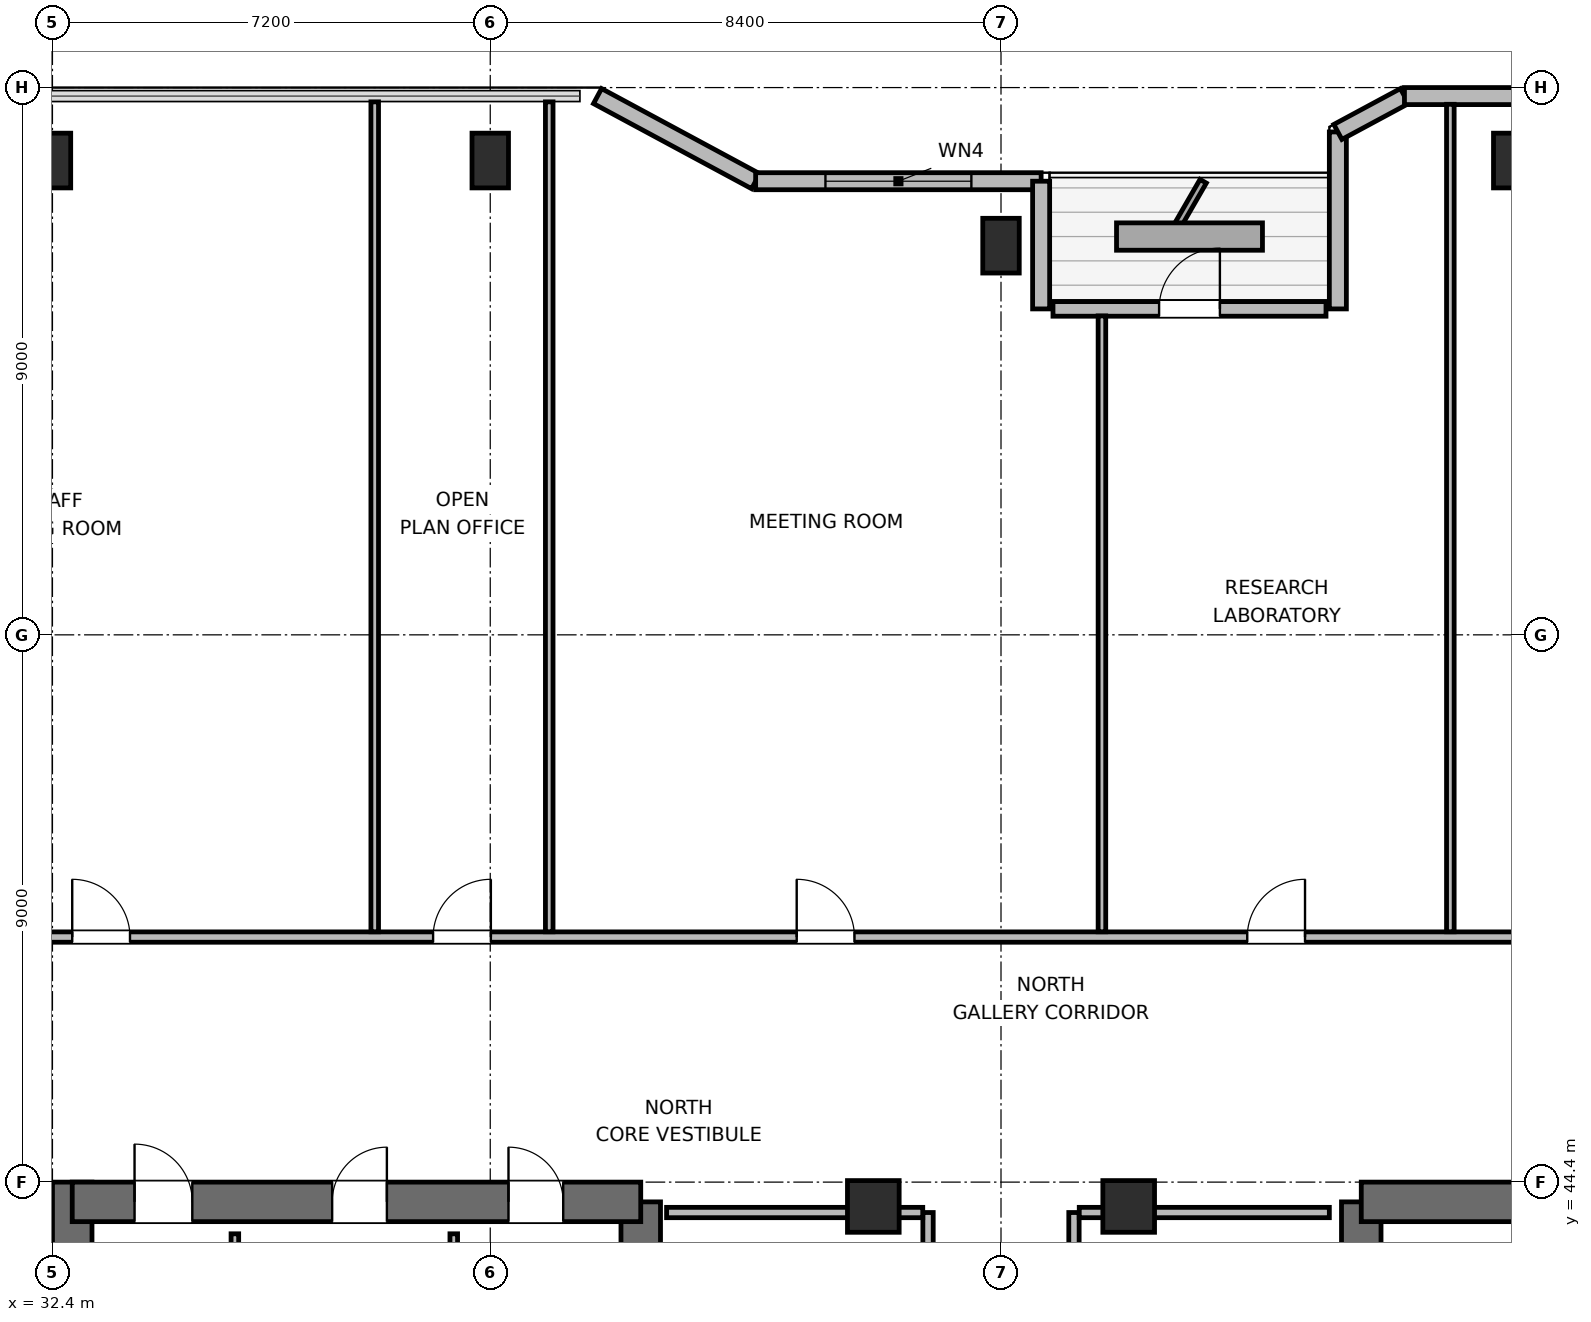
"""IFC4 building model, lengths in metres.
Left out: names, types, materials, properties, quantities, classifications, styles, units other than length and angle.
Written with IfcOpenShell. Run it as: python <this file> out.ifc"""

import sys

from ifc_helpers import new_model, si_unit, direction, frame, frame_2d, origin, origin_2d, place, context, subcontext, project, spatial, rectangle, extrude, element, fill, save


model = new_model("IFC4")
c1 = context("Model", 3, precision=1e-05, world=origin(), true_north=direction((0.0, 1.0)))
c2 = subcontext(c1, "Body", "Model", "MODEL_VIEW")
j1 = project(units=[si_unit("LENGTHUNIT", "METRE"), si_unit("PLANEANGLEUNIT", "RADIAN")], contexts=[c1])
p1 = place(None, origin())
s1 = spatial("IfcSite", under=j1, at=p1, CompositionType="ELEMENT")
p2 = place(p1, origin())
s2 = spatial("IfcBuilding", under=s1, at=p2, CompositionType="ELEMENT")
p3 = place(p2, frame((0.0, 0.0, 223.2)))
s3 = spatial("IfcBuildingStorey", under=s2, at=p3, CompositionType="ELEMENT", Elevation=223.2)
p4 = place(p3, frame((32.725, 27.6, 0.0), z_axis=(0.0, 0.0, 1.0), x_axis=(0.0, 1.0, 0.0)))
e1 = element("IfcWall", 1, at=p4, inside=s3, PredefinedType="SHEAR", context=c2, shape_type="SweptSolid", body=[
    extrude(rectangle(XDim=16.8, YDim=0.65, at=frame_2d((8.4, 0.0))), origin(), (0.0, 0.0, 1.0), 3.9),
])
p5 = place(p3, frame((42.075, 37.8, 0.0), z_axis=(0.0, 0.0, 1.0), x_axis=(0.0, 1.0, 0.0)))
e2 = element("IfcWall", 2, at=p5, inside=s3, PredefinedType="SHEAR", context=c2, shape_type="SweptSolid", body=[
    extrude(rectangle(XDim=6.275, YDim=0.65, at=frame_2d((3.137, 0.0))), origin(), (0.0, 0.0, 1.0), 3.9),
])
p6 = place(p3, frame((32.725, 44.075, 0.0), z_axis=(0.0, 0.0, 1.0), x_axis=(1.0, 0.0, 0.0)))
e3 = element("IfcWall", 3, at=p6, inside=s3, PredefinedType="SHEAR", context=c2, shape_type="SweptSolid", body=[
    extrude(rectangle(XDim=9.35, YDim=0.65, at=frame_2d((4.675, 0.0))), origin(), (0.0, 0.0, 1.0), 3.9),
])
p7 = place(p6, frame((1.025, 0.0, 0.0)))
e4 = element("IfcOpeningElement", 4, at=p7, cuts=e3, PredefinedType="OPENING", context=c2, shape_type="SweptSolid", body=[
    extrude(rectangle(XDim=0.95, YDim=2.04, at=frame_2d((0.475, 1.02))), frame((0.0, 0.335, 0.0), z_axis=(0.0, -1.0, 0.0), x_axis=(1.0, 0.0, 0.0)), (0.0, 0.0, 1.0), 0.67),
])
p8 = place(p6, frame((4.275, 0.0, 0.0)))
e5 = element("IfcOpeningElement", 5, at=p8, cuts=e3, PredefinedType="OPENING", context=c2, shape_type="SweptSolid", body=[
    extrude(rectangle(XDim=0.9, YDim=2.02, at=frame_2d((0.45, 1.01))), frame((0.0, 0.335, 0.0), z_axis=(0.0, -1.0, 0.0), x_axis=(1.0, 0.0, 0.0)), (0.0, 0.0, 1.0), 0.67),
])
p9 = place(p6, frame((7.175, 0.0, 0.0)))
e6 = element("IfcOpeningElement", 6, at=p9, cuts=e3, PredefinedType="OPENING", context=c2, shape_type="SweptSolid", body=[
    extrude(rectangle(XDim=0.9, YDim=2.02, at=frame_2d((0.45, 1.01))), frame((0.0, 0.335, 0.0), z_axis=(0.0, -1.0, 0.0), x_axis=(1.0, 0.0, 0.0)), (0.0, 0.0, 1.0), 0.67),
])
p10 = place(p3, frame((53.925, 38.0, 0.0), z_axis=(0.0, 0.0, 1.0), x_axis=(0.0, 1.0, 0.0)))
e7 = element("IfcWall", 7, at=p10, inside=s3, PredefinedType="SHEAR", context=c2, shape_type="SweptSolid", body=[
    extrude(rectangle(XDim=6.075, YDim=0.65, at=frame_2d((3.038, 0.0))), origin(), (0.0, 0.0, 1.0), 3.9),
])
p11 = place(p3, frame((53.925, 44.075, 0.0), z_axis=(0.0, 0.0, 1.0), x_axis=(1.0, 0.0, 0.0)))
e8 = element("IfcWall", 8, at=p11, inside=s3, PredefinedType="SHEAR", context=c2, shape_type="SweptSolid", body=[
    extrude(rectangle(XDim=9.35, YDim=0.65, at=frame_2d((4.675, 0.0))), origin(), (0.0, 0.0, 1.0), 3.9),
])
for number, where, z_axis, x_axis in (
    (9, (32.4, 61.2, 0.0), (0.0, 0.0, 1.0), (1.0, 0.0, 0.0)),
    (10, (39.6, 61.2, 0.0), (0.0, 0.0, 1.0), (1.0, 0.0, 0.0)),
    (11, (48.0, 59.8, 0.0), (0.0, 0.0, 1.0), (1.0, 0.0, 0.0)),
    (12, (56.4, 61.2, 0.0), (0.0, 0.0, 1.0), (1.0, 0.0, 0.0)),
):
    element("IfcColumn", number, at=place(p3, frame(where, z_axis=z_axis, x_axis=x_axis)), inside=s3, PredefinedType="COLUMN", context=c2, shape_type="SweptSolid", body=[
        extrude(rectangle(XDim=0.6, YDim=0.9, at=origin_2d()), origin(), (0.0, 0.0, 1.0), 3.9),
    ])
for number, where, z_axis, x_axis in (
    (13, (45.9, 44.0, 0.0), (0.0, 0.0, 1.0), (1.0, 0.0, 0.0)),
    (14, (50.1, 44.0, 0.0), (0.0, 0.0, 1.0), (1.0, 0.0, 0.0)),
):
    element("IfcColumn", number, at=place(p3, frame(where, z_axis=z_axis, x_axis=x_axis)), inside=s3, PredefinedType="COLUMN", context=c2, shape_type="SweptSolid", body=[
        extrude(rectangle(XDim=0.85, YDim=0.85, at=origin_2d()), origin(), (0.0, 0.0, 1.0), 3.9),
    ])
p12 = place(p3, frame((41.365, 62.26, 0.0), z_axis=(0.0, 0.0, 1.0), x_axis=(0.880473754814, -0.474094892488, 0.0)))
e15 = element("IfcWall", 15, at=p12, inside=s3, PredefinedType="SOLIDWALL", context=c2, shape_type="SweptSolid", body=[
    extrude(rectangle(XDim=2.953, YDim=0.28, at=frame_2d((1.477, 0.0))), origin(), (0.0, 0.0, 1.0), 2.265),
])
p13 = place(p3, frame((43.965, 60.86, 0.0), z_axis=(0.0, 0.0, 1.0), x_axis=(1.0, 0.0, 0.0)))
e16 = element("IfcWall", 16, at=p13, inside=s3, PredefinedType="SOLIDWALL", context=c2, shape_type="SweptSolid", body=[
    extrude(rectangle(XDim=4.695, YDim=0.28, at=frame_2d((2.348, 0.0))), origin(), (0.0, 0.0, 1.0), 2.265),
])
p14 = place(p13, frame((1.148, 0.0, 0.85)))
e17 = element("IfcOpeningElement", 17, at=p14, cuts=e16, PredefinedType="OPENING", context=c2, shape_type="SweptSolid", body=[
    extrude(rectangle(XDim=2.4, YDim=1.15, at=frame_2d((1.2, 0.575))), frame((0.0, 0.15, 0.0), z_axis=(0.0, -1.0, 0.0), x_axis=(1.0, 0.0, 0.0)), (0.0, 0.0, 1.0), 0.3),
])
p15 = place(p3, frame((48.66, 60.86, 0.0), z_axis=(0.0, 0.0, 1.0), x_axis=(0.0, -1.0, 0.0)))
e18 = element("IfcWall", 18, at=p15, inside=s3, PredefinedType="SOLIDWALL", context=c2, shape_type="SweptSolid", body=[
    extrude(rectangle(XDim=2.1, YDim=0.28, at=frame_2d((1.05, 0.0))), origin(), (0.0, 0.0, 1.0), 2.265),
])
p16 = place(p3, frame((48.855, 58.76, 0.0), z_axis=(0.0, 0.0, 1.0), x_axis=(1.0, 0.0, 0.0)))
e19 = element("IfcWall", 19, at=p16, inside=s3, PredefinedType="SOLIDWALL", context=c2, shape_type="SweptSolid", body=[
    extrude(rectangle(XDim=4.49, YDim=0.24, at=frame_2d((2.245, 0.0))), origin(), (0.0, 0.0, 1.0), 3.68),
])
p17 = place(p16, frame((1.745, 0.0, 0.0)))
e20 = element("IfcOpeningElement", 20, at=p17, cuts=e19, PredefinedType="OPENING", context=c2, shape_type="SweptSolid", body=[
    extrude(rectangle(XDim=1.0, YDim=2.02, at=frame_2d((0.5, 1.01))), frame((0.0, 0.13, 0.0), z_axis=(0.0, -1.0, 0.0), x_axis=(1.0, 0.0, 0.0)), (0.0, 0.0, 1.0), 0.26),
])
p18 = place(p3, frame((53.54, 58.76, 0.0), z_axis=(0.0, 0.0, 1.0), x_axis=(0.0, 1.0, 0.0)))
e21 = element("IfcWall", 21, at=p18, inside=s3, PredefinedType="SOLIDWALL", context=c2, shape_type="SweptSolid", body=[
    extrude(rectangle(XDim=2.91, YDim=0.28, at=frame_2d((1.455, 0.0))), origin(), (0.0, 0.0, 1.0), 2.265),
])
p19 = place(p3, frame((53.54, 61.67, 0.0), z_axis=(0.0, 0.0, 1.0), x_axis=(0.880515214249, 0.474017887296, 0.0)))
e22 = element("IfcWall", 22, at=p19, inside=s3, PredefinedType="SOLIDWALL", context=c2, shape_type="SweptSolid", body=[
    extrude(rectangle(XDim=1.244, YDim=0.28, at=frame_2d((0.622, 0.0))), origin(), (0.0, 0.0, 1.0), 3.68),
])
p20 = place(p3, frame((54.635, 62.26, 0.0), z_axis=(0.0, 0.0, 1.0), x_axis=(1.0, 0.0, 0.0)))
e23 = element("IfcWall", 23, at=p20, inside=s3, PredefinedType="SOLIDWALL", context=c2, shape_type="SweptSolid", body=[
    extrude(rectangle(XDim=10.946, YDim=0.28, at=frame_2d((5.473, 0.0))), origin(), (0.0, 0.0, 1.0), 3.68),
])
for number, where, z_axis, x_axis in (
    (24, (35.4, 41.095, 0.0), (0.0, 0.0, 1.0), (0.0, 1.0, 0.0)),
    (25, (39.0, 41.095, 0.0), (0.0, 0.0, 1.0), (0.0, 1.0, 0.0)),
):
    element("IfcWall", number, at=place(p3, frame(where, z_axis=z_axis, x_axis=x_axis)), inside=s3, PredefinedType="PARTITIONING", context=c2, shape_type="SweptSolid", body=[
        extrude(rectangle(XDim=2.455, YDim=0.125, at=frame_2d((1.228, 0.0))), origin(), (0.0, 0.0, 1.0), 3.68),
    ])
p21 = place(p3, frame((46.8, 37.9, 0.0), z_axis=(0.0, 0.0, 1.0), x_axis=(0.0, 1.0, 0.0)))
e26 = element("IfcWall", 26, at=p21, inside=s3, PredefinedType="PARTITIONING", context=c2, shape_type="SweptSolid", body=[
    extrude(rectangle(XDim=6.0, YDim=0.17, at=frame_2d((3.0, 0.0))), origin(), (0.0, 0.0, 1.0), 3.68),
])
p22 = place(p21, frame((0.54, 0.0, 0.0)))
e27 = element("IfcOpeningElement", 27, at=p22, cuts=e26, PredefinedType="OPENING", context=c2, shape_type="SweptSolid", body=[
    extrude(rectangle(XDim=0.9, YDim=2.02, at=frame_2d((0.45, 1.01))), frame((0.0, 0.095, 0.0), z_axis=(0.0, -1.0, 0.0), x_axis=(1.0, 0.0, 0.0)), (0.0, 0.0, 1.0), 0.19),
])
p23 = place(p21, frame((2.55, 0.0, 0.0)))
e28 = element("IfcOpeningElement", 28, at=p23, cuts=e26, PredefinedType="OPENING", context=c2, shape_type="SweptSolid", body=[
    extrude(rectangle(XDim=0.9, YDim=2.02, at=frame_2d((0.45, 1.01))), frame((0.0, 0.095, 0.0), z_axis=(0.0, -1.0, 0.0), x_axis=(1.0, 0.0, 0.0)), (0.0, 0.0, 1.0), 0.19),
])
p24 = place(p21, frame((4.56, 0.0, 0.0)))
e29 = element("IfcOpeningElement", 29, at=p24, cuts=e26, PredefinedType="OPENING", context=c2, shape_type="SweptSolid", body=[
    extrude(rectangle(XDim=0.9, YDim=2.02, at=frame_2d((0.45, 1.01))), frame((0.0, 0.095, 0.0), z_axis=(0.0, -1.0, 0.0), x_axis=(1.0, 0.0, 0.0)), (0.0, 0.0, 1.0), 0.19),
])
p25 = place(p3, frame((42.5, 43.9, 0.0), z_axis=(0.0, 0.0, 1.0), x_axis=(1.0, 0.0, 0.0)))
e30 = element("IfcWall", 30, at=p25, inside=s3, PredefinedType="PARTITIONING", context=c2, shape_type="SweptSolid", body=[
    extrude(rectangle(XDim=4.213, YDim=0.17, at=frame_2d((2.106, 0.0))), origin(), (0.0, 0.0, 1.0), 2.765),
])
p26 = place(p3, frame((49.2, 37.9, 0.0), z_axis=(0.0, 0.0, 1.0), x_axis=(0.0, 1.0, 0.0)))
e31 = element("IfcWall", 31, at=p26, inside=s3, PredefinedType="PARTITIONING", context=c2, shape_type="SweptSolid", body=[
    extrude(rectangle(XDim=6.0, YDim=0.17, at=frame_2d((3.0, 0.0))), origin(), (0.0, 0.0, 1.0), 3.68),
])
p27 = place(p26, frame((0.69, 0.0, 0.0)))
e32 = element("IfcOpeningElement", 32, at=p27, cuts=e31, PredefinedType="OPENING", context=c2, shape_type="SweptSolid", body=[
    extrude(rectangle(XDim=0.9, YDim=2.02, at=frame_2d((0.45, 1.01))), frame((0.0, 0.095, 0.0), z_axis=(0.0, -1.0, 0.0), x_axis=(1.0, 0.0, 0.0)), (0.0, 0.0, 1.0), 0.19),
])
p28 = place(p26, frame((3.69, 0.0, 0.0)))
e33 = element("IfcOpeningElement", 33, at=p28, cuts=e31, PredefinedType="OPENING", context=c2, shape_type="SweptSolid", body=[
    extrude(rectangle(XDim=0.9, YDim=2.02, at=frame_2d((0.45, 1.01))), frame((0.0, 0.095, 0.0), z_axis=(0.0, -1.0, 0.0), x_axis=(1.0, 0.0, 0.0)), (0.0, 0.0, 1.0), 0.19),
])
p29 = place(p3, frame((49.287, 43.9, 0.0), z_axis=(0.0, 0.0, 1.0), x_axis=(1.0, 0.0, 0.0)))
e34 = element("IfcWall", 34, at=p29, inside=s3, PredefinedType="PARTITIONING", context=c2, shape_type="SweptSolid", body=[
    extrude(rectangle(XDim=4.113, YDim=0.17, at=frame_2d((2.056, 0.0))), origin(), (0.0, 0.0, 1.0), 2.765),
])
p30 = place(p3, frame((28.7, 48.43, 0.0), z_axis=(0.0, 0.0, 1.0), x_axis=(1.0, 0.0, 0.0)))
e35 = element("IfcWall", 35, at=p30, inside=s3, PredefinedType="PARTITIONING", context=c2, shape_type="SweptSolid", body=[
    extrude(rectangle(XDim=34.9, YDim=0.17, at=frame_2d((17.45, 0.0))), origin(), (0.0, 0.0, 1.0), 3.68),
])
p31 = place(p30, frame((4.025, 0.0, 0.0)))
e36 = element("IfcOpeningElement", 36, at=p31, cuts=e35, PredefinedType="OPENING", context=c2, shape_type="SweptSolid", body=[
    extrude(rectangle(XDim=0.95, YDim=2.04, at=frame_2d((0.475, 1.02))), frame((0.0, 0.095, 0.0), z_axis=(0.0, -1.0, 0.0), x_axis=(1.0, 0.0, 0.0)), (0.0, 0.0, 1.0), 0.19),
])
p32 = place(p30, frame((9.96, 0.0, 0.0)))
e37 = element("IfcOpeningElement", 37, at=p32, cuts=e35, PredefinedType="OPENING", context=c2, shape_type="SweptSolid", body=[
    extrude(rectangle(XDim=0.95, YDim=2.04, at=frame_2d((0.475, 1.02))), frame((0.0, 0.095, 0.0), z_axis=(0.0, -1.0, 0.0), x_axis=(1.0, 0.0, 0.0)), (0.0, 0.0, 1.0), 0.19),
])
p33 = place(p30, frame((15.94, 0.0, 0.0)))
e38 = element("IfcOpeningElement", 38, at=p33, cuts=e35, PredefinedType="OPENING", context=c2, shape_type="SweptSolid", body=[
    extrude(rectangle(XDim=0.95, YDim=2.04, at=frame_2d((0.475, 1.02))), frame((0.0, 0.095, 0.0), z_axis=(0.0, -1.0, 0.0), x_axis=(1.0, 0.0, 0.0)), (0.0, 0.0, 1.0), 0.19),
])
p34 = place(p30, frame((23.35, 0.0, 0.0)))
e39 = element("IfcOpeningElement", 39, at=p34, cuts=e35, PredefinedType="OPENING", context=c2, shape_type="SweptSolid", body=[
    extrude(rectangle(XDim=0.95, YDim=2.04, at=frame_2d((0.475, 1.02))), frame((0.0, 0.095, 0.0), z_axis=(0.0, -1.0, 0.0), x_axis=(1.0, 0.0, 0.0)), (0.0, 0.0, 1.0), 0.19),
])
p35 = place(p30, frame((30.32, 0.0, 0.0)))
e40 = element("IfcOpeningElement", 40, at=p35, cuts=e35, PredefinedType="OPENING", context=c2, shape_type="SweptSolid", body=[
    extrude(rectangle(XDim=0.95, YDim=2.04, at=frame_2d((0.475, 1.02))), frame((0.0, 0.095, 0.0), z_axis=(0.0, -1.0, 0.0), x_axis=(1.0, 0.0, 0.0)), (0.0, 0.0, 1.0), 0.19),
])
p36 = place(p3, frame((37.7, 48.517, 0.0), z_axis=(0.0, 0.0, 1.0), x_axis=(0.0, 1.0, 0.0)))
e41 = element("IfcWall", 41, at=p36, inside=s3, PredefinedType="PARTITIONING", context=c2, shape_type="SweptSolid", body=[
    extrude(rectangle(XDim=13.648, YDim=0.125, at=frame_2d((6.824, 0.0))), origin(), (0.0, 0.0, 1.0), 3.68),
])
p37 = place(p3, frame((40.57, 48.517, 0.0), z_axis=(0.0, 0.0, 1.0), x_axis=(0.0, 1.0, 0.0)))
e42 = element("IfcWall", 42, at=p37, inside=s3, PredefinedType="PARTITIONING", context=c2, shape_type="SweptSolid", body=[
    extrude(rectangle(XDim=13.648, YDim=0.125, at=frame_2d((6.824, 0.0))), origin(), (0.0, 0.0, 1.0), 3.043),
])
p38 = place(p3, frame((49.66, 48.517, 0.0), z_axis=(0.0, 0.0, 1.0), x_axis=(0.0, 1.0, 0.0)))
e43 = element("IfcWall", 43, at=p38, inside=s3, PredefinedType="PARTITIONING", context=c2, shape_type="SweptSolid", body=[
    extrude(rectangle(XDim=10.128, YDim=0.125, at=frame_2d((5.064, 0.0))), origin(), (0.0, 0.0, 1.0), 3.68),
])
p39 = place(p3, frame((55.39, 48.517, 0.0), z_axis=(0.0, 0.0, 1.0), x_axis=(0.0, 1.0, 0.0)))
e44 = element("IfcWall", 44, at=p39, inside=s3, PredefinedType="PARTITIONING", context=c2, shape_type="SweptSolid", body=[
    extrude(rectangle(XDim=13.608, YDim=0.125, at=frame_2d((6.804, 0.0))), origin(), (0.0, 0.0, 1.0), 3.043),
])
p40 = place(p14, origin())
e45 = element("IfcWindow", 45, at=p40, inside=s3, PartitioningType="SINGLE_PANEL", PredefinedType="WINDOW", context=c2, shape_type="SweptSolid", body=[
    extrude(rectangle(XDim=2.4, YDim=1.15, at=frame_2d((1.2, 0.575))), frame((0.0, 0.03, 0.0), z_axis=(0.0, -1.0, 0.0), x_axis=(1.0, 0.0, 0.0)), (0.0, 0.0, 1.0), 0.06),
])
fill(e17, e45)
p41 = place(p17, origin())
e46 = element("IfcDoor", 46, at=p41, inside=s3, OperationType="SINGLE_SWING_RIGHT", PredefinedType="DOOR", context=c2, shape_type="SweptSolid", body=[
    extrude(rectangle(XDim=1.0, YDim=2.02, at=frame_2d((0.5, 1.01))), frame((0.0, 0.025, 0.0), z_axis=(0.0, -1.0, 0.0), x_axis=(1.0, 0.0, 0.0)), (0.0, 0.0, 1.0), 0.05),
])
fill(e20, e46)
p42 = place(p7, origin())
e47 = element("IfcDoor", 47, at=p42, inside=s3, OperationType="SINGLE_SWING_LEFT", PredefinedType="DOOR", context=c2, shape_type="SweptSolid", body=[
    extrude(rectangle(XDim=0.95, YDim=2.04, at=frame_2d((0.475, 1.02))), frame((0.0, 0.025, 0.0), z_axis=(0.0, -1.0, 0.0), x_axis=(1.0, 0.0, 0.0)), (0.0, 0.0, 1.0), 0.05),
])
fill(e4, e47)
p43 = place(p8, origin())
e48 = element("IfcDoor", 48, at=p43, inside=s3, OperationType="SINGLE_SWING_RIGHT", PredefinedType="DOOR", context=c2, shape_type="SweptSolid", body=[
    extrude(rectangle(XDim=0.9, YDim=2.02, at=frame_2d((0.45, 1.01))), frame((0.0, 0.025, 0.0), z_axis=(0.0, -1.0, 0.0), x_axis=(1.0, 0.0, 0.0)), (0.0, 0.0, 1.0), 0.05),
])
fill(e5, e48)
p44 = place(p9, origin())
e49 = element("IfcDoor", 49, at=p44, inside=s3, OperationType="SINGLE_SWING_LEFT", PredefinedType="DOOR", context=c2, shape_type="SweptSolid", body=[
    extrude(rectangle(XDim=0.9, YDim=2.02, at=frame_2d((0.45, 1.01))), frame((0.0, 0.025, 0.0), z_axis=(0.0, -1.0, 0.0), x_axis=(1.0, 0.0, 0.0)), (0.0, 0.0, 1.0), 0.05),
])
fill(e6, e49)
p45 = place(p31, origin())
e50 = element("IfcDoor", 50, at=p45, inside=s3, OperationType="SINGLE_SWING_LEFT", PredefinedType="DOOR", context=c2, shape_type="SweptSolid", body=[
    extrude(rectangle(XDim=0.95, YDim=2.04, at=frame_2d((0.475, 1.02))), frame((0.0, 0.025, 0.0), z_axis=(0.0, -1.0, 0.0), x_axis=(1.0, 0.0, 0.0)), (0.0, 0.0, 1.0), 0.05),
])
fill(e36, e50)
p46 = place(p32, origin())
e51 = element("IfcDoor", 51, at=p46, inside=s3, OperationType="SINGLE_SWING_RIGHT", PredefinedType="DOOR", context=c2, shape_type="SweptSolid", body=[
    extrude(rectangle(XDim=0.95, YDim=2.04, at=frame_2d((0.475, 1.02))), frame((0.0, 0.025, 0.0), z_axis=(0.0, -1.0, 0.0), x_axis=(1.0, 0.0, 0.0)), (0.0, 0.0, 1.0), 0.05),
])
fill(e37, e51)
p47 = place(p33, origin())
e52 = element("IfcDoor", 52, at=p47, inside=s3, OperationType="SINGLE_SWING_LEFT", PredefinedType="DOOR", context=c2, shape_type="SweptSolid", body=[
    extrude(rectangle(XDim=0.95, YDim=2.04, at=frame_2d((0.475, 1.02))), frame((0.0, 0.025, 0.0), z_axis=(0.0, -1.0, 0.0), x_axis=(1.0, 0.0, 0.0)), (0.0, 0.0, 1.0), 0.05),
])
fill(e38, e52)
p48 = place(p34, origin())
e53 = element("IfcDoor", 53, at=p48, inside=s3, OperationType="SINGLE_SWING_RIGHT", PredefinedType="DOOR", context=c2, shape_type="SweptSolid", body=[
    extrude(rectangle(XDim=0.95, YDim=2.04, at=frame_2d((0.475, 1.02))), frame((0.0, 0.025, 0.0), z_axis=(0.0, -1.0, 0.0), x_axis=(1.0, 0.0, 0.0)), (0.0, 0.0, 1.0), 0.05),
])
fill(e39, e53)
save(model, sys.argv[1])
